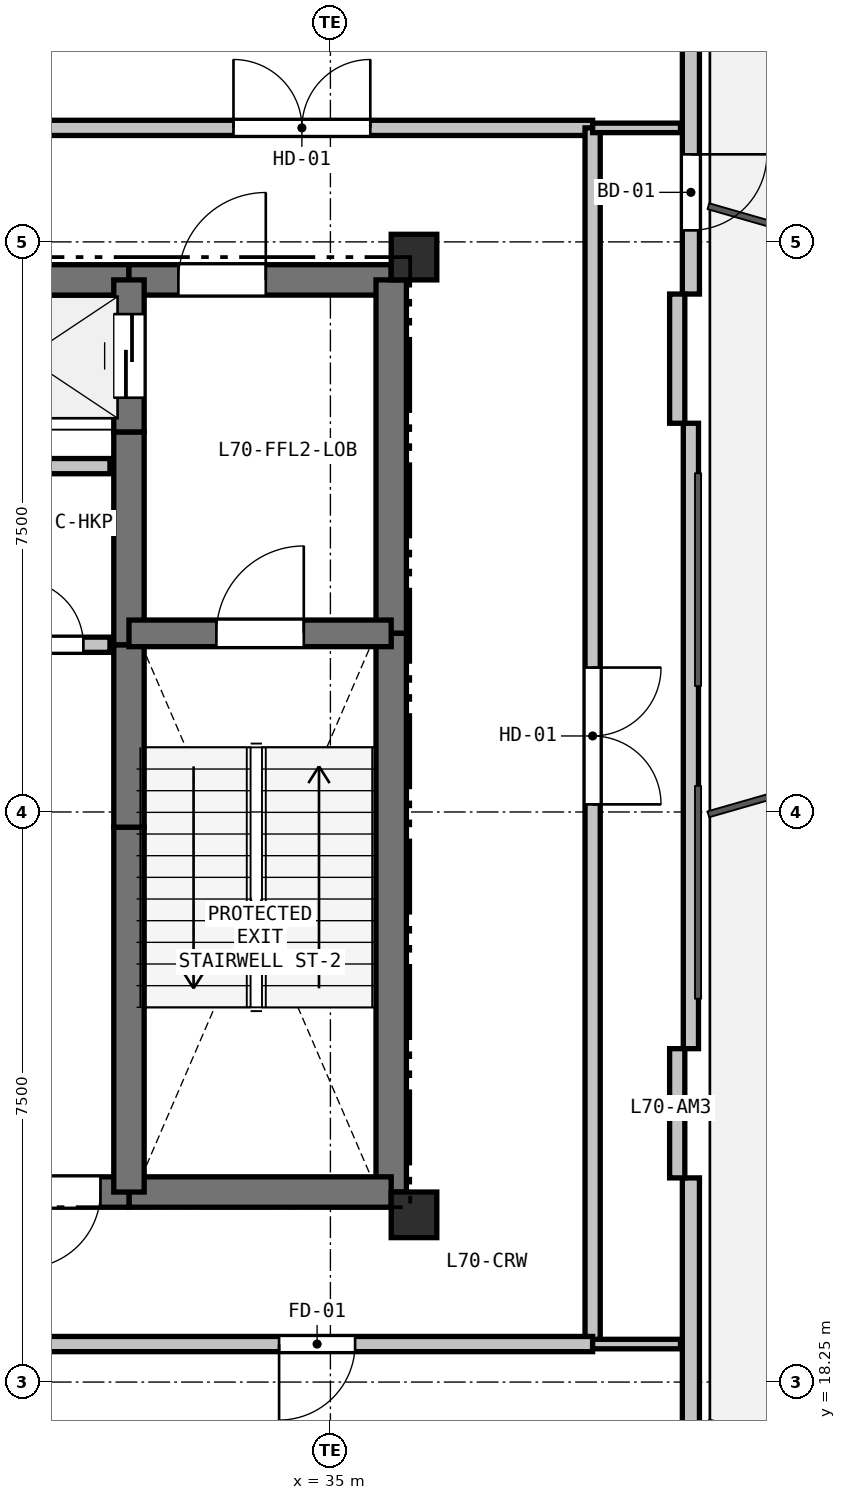
"""IFC4 building model, lengths in metres.
Left out: names, types, materials, properties, quantities, classifications, styles, units other than length and angle.
Written with IfcOpenShell. Run it as: python <this file> out.ifc"""

import sys

from ifc_helpers import new_model, si_unit, direction, frame, frame_2d, origin, origin_2d, place, context, subcontext, project, spatial, rectangle, extrude, element, fill, save


model = new_model("IFC4")
c1 = context("Model", 3, precision=1e-05, world=origin(), true_north=direction((0.0, 1.0)))
c2 = subcontext(c1, "Body", "Model", "MODEL_VIEW")
j1 = project(units=[si_unit("LENGTHUNIT", "METRE"), si_unit("PLANEANGLEUNIT", "RADIAN")], contexts=[c1])
p1 = place(None, origin())
s1 = spatial("IfcSite", under=j1, at=p1, CompositionType="ELEMENT")
p2 = place(p1, origin())
s2 = spatial("IfcBuilding", under=s1, at=p2, CompositionType="ELEMENT")
p3 = place(p2, frame((0.0, 0.0, 249.6)))
s3 = spatial("IfcBuildingStorey", under=s2, at=p3, CompositionType="ELEMENT", Elevation=249.6)
for number, where, z_axis, x_axis in (
    (1, (36.1, 33.05, 0.0), (0.0, 0.0, 1.0), (1.0, 0.0, 0.0)),
    (2, (36.1, 20.45, 0.0), (0.0, 0.0, 1.0), (1.0, 0.0, 0.0)),
):
    element("IfcColumn", number, at=place(p3, frame(where, z_axis=z_axis, x_axis=x_axis)), inside=s3, PredefinedType="COLUMN", context=c2, shape_type="SweptSolid", body=[
        extrude(rectangle(XDim=0.6, YDim=0.6, at=origin_2d()), origin(), (0.0, 0.0, 1.0), 4.5),
    ])
p4 = place(p3, frame((39.743, 41.492, 0.0), z_axis=(0.0, 0.0, 1.0), x_axis=(0.0, -1.0, 0.0)))
e3 = element("IfcWall", 3, at=p4, inside=s3, PredefinedType="SOLIDWALL", context=c2, shape_type="SweptSolid", body=[
    extrude(rectangle(XDim=8.928, YDim=0.225, at=frame_2d((4.464, 0.0))), origin(), (0.0, 0.0, 1.0), 3.84),
])
p5 = place(p4, frame((7.09, 0.0, 0.0)))
e4 = element("IfcOpeningElement", 4, at=p5, cuts=e3, PredefinedType="OPENING", context=c2, shape_type="SweptSolid", body=[
    extrude(rectangle(XDim=1.0, YDim=2.1, at=frame_2d((0.5, 1.05))), frame((0.0, 0.123, 0.0), z_axis=(0.0, -1.0, 0.0), x_axis=(1.0, 0.0, 0.0)), (0.0, 0.0, 1.0), 0.245),
])
p6 = place(p3, frame((39.743, 30.864, 0.0), z_axis=(0.0, 0.0, 1.0), x_axis=(0.0, -1.0, 0.0)))
e5 = element("IfcWall", 5, at=p6, inside=s3, PredefinedType="PARAPET", context=c2, shape_type="SweptSolid", body=[
    extrude(rectangle(XDim=8.228, YDim=0.2, at=frame_2d((4.114, 0.0))), origin(), (0.0, 0.0, 1.0), 0.2),
])
p7 = place(p3, frame((39.743, 20.936, 0.0), z_axis=(0.0, 0.0, 1.0), x_axis=(0.0, -1.0, 0.0)))
e6 = element("IfcWall", 6, at=p7, inside=s3, PredefinedType="SOLIDWALL", context=c2, shape_type="SweptSolid", body=[
    extrude(rectangle(XDim=8.928, YDim=0.225, at=frame_2d((4.464, 0.0))), origin(), (0.0, 0.0, 1.0), 3.84),
])
p8 = place(p7, frame((6.262, 0.0, 0.9)))
e7 = element("IfcOpeningElement", 7, at=p8, cuts=e6, PredefinedType="OPENING", context=c2, shape_type="SweptSolid", body=[
    extrude(rectangle(XDim=0.9, YDim=1.4, at=frame_2d((0.45, 0.7))), frame((0.0, 0.123, 0.0), z_axis=(0.0, -1.0, 0.0), x_axis=(1.0, 0.0, 0.0)), (0.0, 0.0, 1.0), 0.245),
])
for number, where, z_axis, x_axis in (
    (8, (39.563, 32.564, 0.0), (0.0, 0.0, 1.0), (0.0, -1.0, 0.0)),
    (9, (39.563, 22.636, 0.0), (0.0, 0.0, 1.0), (0.0, -1.0, 0.0)),
):
    element("IfcWall", number, at=place(p3, frame(where, z_axis=z_axis, x_axis=x_axis)), inside=s3, PredefinedType="PARAPET", context=c2, shape_type="SweptSolid", body=[
        extrude(rectangle(XDim=1.7, YDim=0.2, at=frame_2d((0.85, 0.0))), origin(), (0.0, 0.0, 1.0), 3.84),
    ])
p9 = place(p3, frame((29.65, 32.75, 0.0), z_axis=(0.0, 0.0, 1.0), x_axis=(1.0, 0.0, 0.0)))
e10 = element("IfcWall", 10, at=p9, inside=s3, PredefinedType="SHEAR", context=c2, shape_type="SweptSolid", body=[
    extrude(rectangle(XDim=2.7, YDim=0.4, at=frame_2d((1.35, 0.0))), origin(), (0.0, 0.0, 1.0), 4.22),
])
p10 = place(p3, frame((32.35, 32.75, 0.0), z_axis=(0.0, 0.0, 1.0), x_axis=(1.0, 0.0, 0.0)))
e11 = element("IfcWall", 11, at=p10, inside=s3, PredefinedType="SHEAR", context=c2, shape_type="SweptSolid", body=[
    extrude(rectangle(XDim=3.45, YDim=0.4, at=frame_2d((1.725, 0.0))), origin(), (0.0, 0.0, 1.0), 4.22),
])
p11 = place(p10, frame((0.65, 0.0, 0.0)))
e12 = element("IfcOpeningElement", 12, at=p11, cuts=e11, PredefinedType="OPENING", context=c2, shape_type="SweptSolid", body=[
    extrude(rectangle(XDim=1.15, YDim=2.15, at=frame_2d((0.575, 1.075))), frame((0.0, 0.21, 0.0), z_axis=(0.0, -1.0, 0.0), x_axis=(1.0, 0.0, 0.0)), (0.0, 0.0, 1.0), 0.42),
])
p12 = place(p3, frame((35.8, 32.75, 0.0), z_axis=(0.0, 0.0, 1.0), x_axis=(0.0, -1.0, 0.0)))
e13 = element("IfcWall", 13, at=p12, inside=s3, PredefinedType="SHEAR", context=c2, shape_type="SweptSolid", body=[
    extrude(rectangle(XDim=4.65, YDim=0.4, at=frame_2d((2.325, 0.0))), origin(), (0.0, 0.0, 1.0), 4.22),
])
p13 = place(p3, frame((35.8, 28.1, 0.0), z_axis=(0.0, 0.0, 1.0), x_axis=(0.0, -1.0, 0.0)))
e14 = element("IfcWall", 14, at=p13, inside=s3, PredefinedType="SHEAR", context=c2, shape_type="SweptSolid", body=[
    extrude(rectangle(XDim=7.35, YDim=0.4, at=frame_2d((3.675, 0.0))), origin(), (0.0, 0.0, 1.0), 4.22),
])
p14 = place(p3, frame((35.8, 20.75, 0.0), z_axis=(0.0, 0.0, 1.0), x_axis=(-1.0, 0.0, 0.0)))
e15 = element("IfcWall", 15, at=p14, inside=s3, PredefinedType="SHEAR", context=c2, shape_type="SweptSolid", body=[
    extrude(rectangle(XDim=3.45, YDim=0.4, at=frame_2d((1.725, 0.0))), origin(), (0.0, 0.0, 1.0), 4.22),
])
p15 = place(p3, frame((32.35, 20.75, 0.0), z_axis=(0.0, 0.0, 1.0), x_axis=(-1.0, 0.0, 0.0)))
e16 = element("IfcWall", 16, at=p15, inside=s3, PredefinedType="SHEAR", context=c2, shape_type="SweptSolid", body=[
    extrude(rectangle(XDim=1.75, YDim=0.4, at=frame_2d((0.875, 0.0))), origin(), (0.0, 0.0, 1.0), 4.22),
])
p16 = place(p15, frame((0.375, 0.0, 0.0)))
e17 = element("IfcOpeningElement", 17, at=p16, cuts=e16, PredefinedType="OPENING", context=c2, shape_type="SweptSolid", body=[
    extrude(rectangle(XDim=1.0, YDim=2.15, at=frame_2d((0.5, 1.075))), frame((0.0, 0.21, 0.0), z_axis=(0.0, -1.0, 0.0), x_axis=(1.0, 0.0, 0.0)), (0.0, 0.0, 1.0), 0.42),
])
p17 = place(p3, frame((32.35, 20.75, 0.0), z_axis=(0.0, 0.0, 1.0), x_axis=(0.0, 1.0, 0.0)))
e18 = element("IfcWall", 18, at=p17, inside=s3, PredefinedType="SHEAR", context=c2, shape_type="SweptSolid", body=[
    extrude(rectangle(XDim=4.8, YDim=0.4, at=frame_2d((2.4, 0.0))), origin(), (0.0, 0.0, 1.0), 4.22),
])
p18 = place(p3, frame((32.35, 25.55, 0.0), z_axis=(0.0, 0.0, 1.0), x_axis=(0.0, 1.0, 0.0)))
e19 = element("IfcWall", 19, at=p18, inside=s3, PredefinedType="SHEAR", context=c2, shape_type="SweptSolid", body=[
    extrude(rectangle(XDim=2.4, YDim=0.4, at=frame_2d((1.2, 0.0))), origin(), (0.0, 0.0, 1.0), 4.22),
])
p19 = place(p3, frame((32.35, 27.95, 0.0), z_axis=(0.0, 0.0, 1.0), x_axis=(0.0, 1.0, 0.0)))
e20 = element("IfcWall", 20, at=p19, inside=s3, PredefinedType="SHEAR", context=c2, shape_type="SweptSolid", body=[
    extrude(rectangle(XDim=2.8, YDim=0.4, at=frame_2d((1.4, 0.0))), origin(), (0.0, 0.0, 1.0), 4.22),
])
p20 = place(p3, frame((32.35, 30.75, 0.0), z_axis=(0.0, 0.0, 1.0), x_axis=(0.0, 1.0, 0.0)))
e21 = element("IfcWall", 21, at=p20, inside=s3, PredefinedType="SHEAR", context=c2, shape_type="SweptSolid", body=[
    extrude(rectangle(XDim=2.0, YDim=0.4, at=frame_2d((1.0, 0.0))), origin(), (0.0, 0.0, 1.0), 4.22),
])
p21 = place(p20, frame((0.45, 0.0, 0.0)))
e22 = element("IfcOpeningElement", 22, at=p21, cuts=e21, PredefinedType="OPENING", context=c2, shape_type="SweptSolid", body=[
    extrude(rectangle(XDim=1.1, YDim=2.15, at=frame_2d((0.55, 1.075))), frame((0.0, 0.21, 0.0), z_axis=(0.0, -1.0, 0.0), x_axis=(1.0, 0.0, 0.0)), (0.0, 0.0, 1.0), 0.42),
])
p22 = place(p3, frame((32.35, 28.1, 0.0), z_axis=(0.0, 0.0, 1.0), x_axis=(1.0, 0.0, 0.0)))
e23 = element("IfcWall", 23, at=p22, inside=s3, PredefinedType="SHEAR", context=c2, shape_type="SweptSolid", body=[
    extrude(rectangle(XDim=3.45, YDim=0.35, at=frame_2d((1.725, 0.0))), origin(), (0.0, 0.0, 1.0), 4.22),
])
p23 = place(p22, frame((1.15, 0.0, 0.0)))
e24 = element("IfcOpeningElement", 24, at=p23, cuts=e23, PredefinedType="OPENING", context=c2, shape_type="SweptSolid", body=[
    extrude(rectangle(XDim=1.15, YDim=2.15, at=frame_2d((0.575, 1.075))), frame((0.0, 0.185, 0.0), z_axis=(0.0, -1.0, 0.0), x_axis=(1.0, 0.0, 0.0)), (0.0, 0.0, 1.0), 0.37),
])
p24 = place(p3, frame((32.1, 30.3, 0.0), z_axis=(0.0, 0.0, 1.0), x_axis=(-1.0, 0.0, 0.0)))
e25 = element("IfcWall", 25, at=p24, inside=s3, PredefinedType="PARTITIONING", context=c2, shape_type="SweptSolid", body=[
    extrude(rectangle(XDim=1.55, YDim=0.2, at=frame_2d((0.775, 0.0))), origin(), (0.0, 0.0, 1.0), 4.22),
])
p25 = place(p3, frame((30.55, 27.95, 0.0), z_axis=(0.0, 0.0, 1.0), x_axis=(1.0, 0.0, 0.0)))
e26 = element("IfcWall", 26, at=p25, inside=s3, PredefinedType="PARTITIONING", context=c2, shape_type="SweptSolid", body=[
    extrude(rectangle(XDim=1.55, YDim=0.2, at=frame_2d((0.775, 0.0))), origin(), (0.0, 0.0, 1.0), 4.22),
])
p26 = place(p25, frame((0.35, 0.0, 0.0)))
e27 = element("IfcOpeningElement", 27, at=p26, cuts=e26, PredefinedType="OPENING", context=c2, shape_type="SweptSolid", body=[
    extrude(rectangle(XDim=0.85, YDim=2.1, at=frame_2d((0.425, 1.05))), frame((0.0, 0.11, 0.0), z_axis=(0.0, -1.0, 0.0), x_axis=(1.0, 0.0, 0.0)), (0.0, 0.0, 1.0), 0.22),
])
p27 = place(p3, frame((30.8, 34.75, 0.0), z_axis=(0.0, 0.0, 1.0), x_axis=(1.0, 0.0, 0.0)))
e28 = element("IfcWall", 28, at=p27, inside=s3, PredefinedType="PARTITIONING", context=c2, shape_type="SweptSolid", body=[
    extrude(rectangle(XDim=7.65, YDim=0.2, at=frame_2d((3.825, 0.0))), origin(), (0.0, 0.0, 1.0), 3.668),
])
p28 = place(p27, frame((2.925, 0.0, 0.0)))
e29 = element("IfcOpeningElement", 29, at=p28, cuts=e28, PredefinedType="OPENING", context=c2, shape_type="SweptSolid", body=[
    extrude(rectangle(XDim=1.8, YDim=2.2, at=frame_2d((0.9, 1.1))), frame((0.0, 0.11, 0.0), z_axis=(0.0, -1.0, 0.0), x_axis=(1.0, 0.0, 0.0)), (0.0, 0.0, 1.0), 0.22),
])
p29 = place(p3, frame((38.45, 34.75, 0.0), z_axis=(0.0, 0.0, 1.0), x_axis=(0.0, -1.0, 0.0)))
e30 = element("IfcWall", 30, at=p29, inside=s3, PredefinedType="PARTITIONING", context=c2, shape_type="SweptSolid", body=[
    extrude(rectangle(XDim=16.0, YDim=0.2, at=frame_2d((8.0, 0.0))), origin(), (0.0, 0.0, 1.0), 4.22),
])
p30 = place(p29, frame((7.1, 0.0, 0.0)))
e31 = element("IfcOpeningElement", 31, at=p30, cuts=e30, PredefinedType="OPENING", context=c2, shape_type="SweptSolid", body=[
    extrude(rectangle(XDim=1.8, YDim=2.2, at=frame_2d((0.9, 1.1))), frame((0.0, 0.11, 0.0), z_axis=(0.0, -1.0, 0.0), x_axis=(1.0, 0.0, 0.0)), (0.0, 0.0, 1.0), 0.22),
])
p31 = place(p3, frame((38.45, 18.75, 0.0), z_axis=(0.0, 0.0, 1.0), x_axis=(-1.0, 0.0, 0.0)))
e32 = element("IfcWall", 32, at=p31, inside=s3, PredefinedType="PARTITIONING", context=c2, shape_type="SweptSolid", body=[
    extrude(rectangle(XDim=7.25, YDim=0.2, at=frame_2d((3.625, 0.0))), origin(), (0.0, 0.0, 1.0), 3.668),
])
p32 = place(p31, frame((3.125, 0.0, 0.0)))
e33 = element("IfcOpeningElement", 33, at=p32, cuts=e32, PredefinedType="OPENING", context=c2, shape_type="SweptSolid", body=[
    extrude(rectangle(XDim=1.0, YDim=2.15, at=frame_2d((0.5, 1.075))), frame((0.0, 0.11, 0.0), z_axis=(0.0, -1.0, 0.0), x_axis=(1.0, 0.0, 0.0)), (0.0, 0.0, 1.0), 0.22),
])
for number, where, z_axis, x_axis in (
    (34, (39.606, 34.75, 0.0), (0.0, 0.0, 1.0), (-1.0, 0.0, 0.0)),
    (35, (39.606, 18.75, 0.0), (0.0, 0.0, 1.0), (-1.0, 0.0, 0.0)),
):
    element("IfcWall", number, at=place(p3, frame(where, z_axis=z_axis, x_axis=x_axis)), inside=s3, PredefinedType="PARTITIONING", context=c2, shape_type="SweptSolid", body=[
        extrude(rectangle(XDim=1.156, YDim=0.125, at=frame_2d((0.578, 0.0))), origin(), (0.0, 0.0, 1.0), 2.365),
    ])
p33 = place(p5, origin())
e36 = element("IfcDoor", 36, at=p33, inside=s3, OperationType="SINGLE_SWING_LEFT", PredefinedType="DOOR", context=c2, shape_type="SweptSolid", body=[
    extrude(rectangle(XDim=1.0, YDim=2.1, at=frame_2d((0.5, 1.05))), frame((0.0, 0.025, 0.0), z_axis=(0.0, -1.0, 0.0), x_axis=(1.0, 0.0, 0.0)), (0.0, 0.0, 1.0), 0.05),
])
fill(e4, e36)
p34 = place(p16, origin())
e37 = element("IfcDoor", 37, at=p34, inside=s3, OperationType="SINGLE_SWING_RIGHT", PredefinedType="DOOR", context=c2, shape_type="SweptSolid", body=[
    extrude(rectangle(XDim=1.0, YDim=2.15, at=frame_2d((0.5, 1.075))), frame((0.0, 0.025, 0.0), z_axis=(0.0, -1.0, 0.0), x_axis=(1.0, 0.0, 0.0)), (0.0, 0.0, 1.0), 0.05),
])
fill(e17, e37)
p35 = place(p21, origin())
e38 = element("IfcDoor", 38, at=p35, inside=s3, OperationType="SLIDING_TO_LEFT", PredefinedType="DOOR", context=c2, shape_type="SweptSolid", body=[
    extrude(rectangle(XDim=1.1, YDim=2.15, at=frame_2d((0.55, 1.075))), frame((0.0, 0.025, 0.0), z_axis=(0.0, -1.0, 0.0), x_axis=(1.0, 0.0, 0.0)), (0.0, 0.0, 1.0), 0.05),
])
fill(e22, e38)
p36 = place(p23, origin())
e39 = element("IfcDoor", 39, at=p36, inside=s3, OperationType="SINGLE_SWING_RIGHT", PredefinedType="DOOR", context=c2, shape_type="SweptSolid", body=[
    extrude(rectangle(XDim=1.15, YDim=2.15, at=frame_2d((0.575, 1.075))), frame((0.0, 0.025, 0.0), z_axis=(0.0, -1.0, 0.0), x_axis=(1.0, 0.0, 0.0)), (0.0, 0.0, 1.0), 0.05),
])
fill(e24, e39)
p37 = place(p11, origin())
e40 = element("IfcDoor", 40, at=p37, inside=s3, OperationType="SINGLE_SWING_RIGHT", PredefinedType="DOOR", context=c2, shape_type="SweptSolid", body=[
    extrude(rectangle(XDim=1.15, YDim=2.15, at=frame_2d((0.575, 1.075))), frame((0.0, 0.025, 0.0), z_axis=(0.0, -1.0, 0.0), x_axis=(1.0, 0.0, 0.0)), (0.0, 0.0, 1.0), 0.05),
])
fill(e12, e40)
p38 = place(p26, origin())
e41 = element("IfcDoor", 41, at=p38, inside=s3, OperationType="SINGLE_SWING_LEFT", PredefinedType="DOOR", context=c2, shape_type="SweptSolid", body=[
    extrude(rectangle(XDim=0.85, YDim=2.1, at=frame_2d((0.425, 1.05))), frame((0.0, 0.025, 0.0), z_axis=(0.0, -1.0, 0.0), x_axis=(1.0, 0.0, 0.0)), (0.0, 0.0, 1.0), 0.05),
])
fill(e27, e41)
p39 = place(p28, origin())
e42 = element("IfcDoor", 42, at=p39, inside=s3, OperationType="DOUBLE_DOOR_SINGLE_SWING", PredefinedType="DOOR", context=c2, shape_type="SweptSolid", body=[
    extrude(rectangle(XDim=1.8, YDim=2.2, at=frame_2d((0.9, 1.1))), frame((0.0, 0.025, 0.0), z_axis=(0.0, -1.0, 0.0), x_axis=(1.0, 0.0, 0.0)), (0.0, 0.0, 1.0), 0.05),
])
fill(e29, e42)
p40 = place(p30, origin())
e43 = element("IfcDoor", 43, at=p40, inside=s3, OperationType="DOUBLE_DOOR_SINGLE_SWING", PredefinedType="DOOR", context=c2, shape_type="SweptSolid", body=[
    extrude(rectangle(XDim=1.8, YDim=2.2, at=frame_2d((0.9, 1.1))), frame((0.0, 0.025, 0.0), z_axis=(0.0, -1.0, 0.0), x_axis=(1.0, 0.0, 0.0)), (0.0, 0.0, 1.0), 0.05),
])
fill(e31, e43)
p41 = place(p32, origin())
e44 = element("IfcDoor", 44, at=p41, inside=s3, OperationType="SINGLE_SWING_RIGHT", PredefinedType="DOOR", context=c2, shape_type="SweptSolid", body=[
    extrude(rectangle(XDim=1.0, YDim=2.15, at=frame_2d((0.5, 1.075))), frame((0.0, 0.025, 0.0), z_axis=(0.0, -1.0, 0.0), x_axis=(1.0, 0.0, 0.0)), (0.0, 0.0, 1.0), 0.05),
])
fill(e33, e44)
save(model, sys.argv[1])
